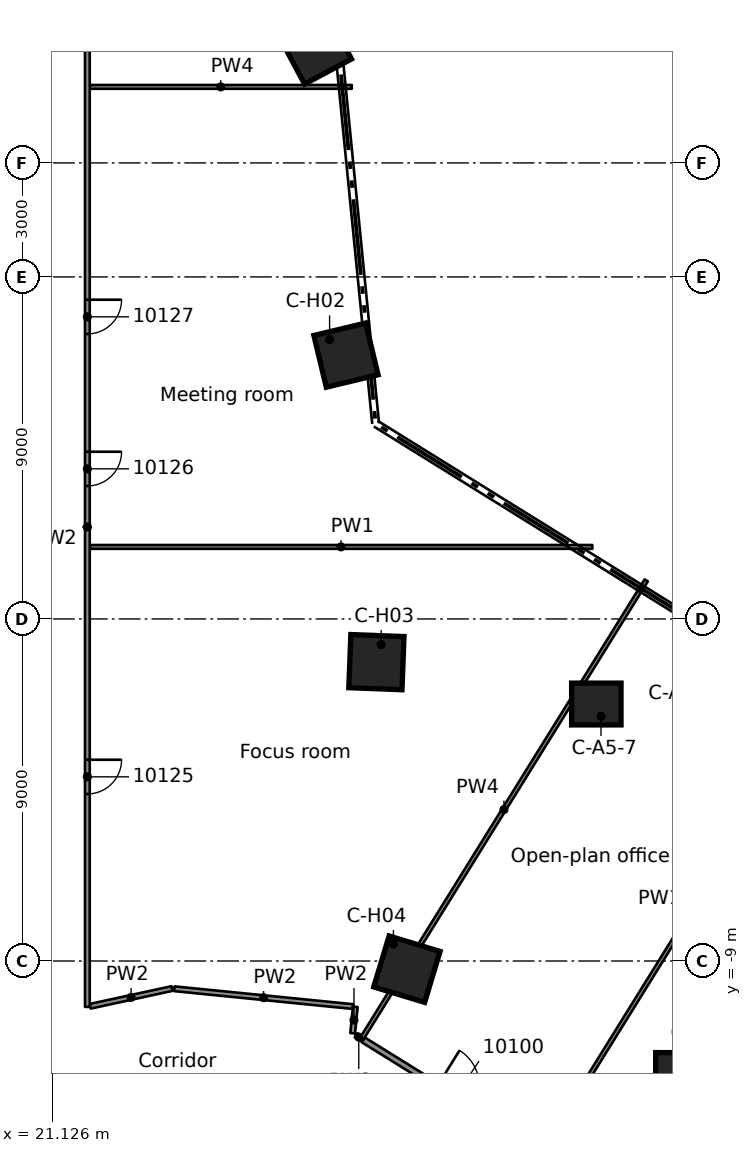
"""IFC4 building model, lengths in metres.
Left out: names, types, materials, properties, quantities, classifications, styles, units other than length and angle.
Written with IfcOpenShell. Run it as: python <this file> out.ifc"""

import sys

from ifc_helpers import new_model, si_unit, direction, frame, frame_2d, origin, origin_2d, place, context, subcontext, project, spatial, rectangle, extrude, element, fill, save


model = new_model("IFC4")
c1 = context("Model", 3, precision=1e-05, world=origin(), true_north=direction((0.0, 1.0)))
c2 = subcontext(c1, "Body", "Model", "MODEL_VIEW")
j1 = project(units=[si_unit("LENGTHUNIT", "METRE"), si_unit("PLANEANGLEUNIT", "RADIAN")], contexts=[c1])
p1 = place(None, origin())
s1 = spatial("IfcSite", under=j1, at=p1, CompositionType="ELEMENT")
p2 = place(p1, origin())
s2 = spatial("IfcBuilding", under=s1, at=p2, CompositionType="ELEMENT")
p3 = place(p2, frame((0.0, 0.0, 51.3)))
s3 = spatial("IfcBuildingStorey", under=s2, at=p3, CompositionType="ELEMENT", Elevation=51.3)
for number, where, z_axis, x_axis in (
    (1, (37.655, -11.96, 0.0), (0.0, 0.0, 1.0), (1.0, 0.0, 0.0)),
    (2, (35.444, -2.238, 0.0), (0.0, 0.0, 1.0), (1.0, 0.0, 0.0)),
):
    element("IfcColumn", number, at=place(p3, frame(where, z_axis=z_axis, x_axis=x_axis)), inside=s3, PredefinedType="COLUMN", context=c2, shape_type="SweptSolid", body=[
        extrude(rectangle(XDim=1.3, YDim=1.1, at=origin_2d()), origin(), (0.0, 0.0, 1.0), 3.5),
    ])
for number, where, z_axis, x_axis in (
    (3, (28.054, 15.021, 0.0), (0.0, 0.0, 1.0), (0.882, 0.472, 0.0)),
    (4, (28.856, 6.942, 0.0), (0.0, 0.0, 1.0), (0.972, 0.234, 0.0)),
    (5, (29.657, -1.136, 0.0), (0.0, 0.0, 1.0), (0.999, -0.038, 0.0)),
    (6, (30.459, -9.215, 0.0), (0.0, 0.0, 1.0), (0.957, -0.29, 0.0)),
):
    element("IfcColumn", number, at=place(p3, frame(where, z_axis=z_axis, x_axis=x_axis)), inside=s3, PredefinedType="COLUMN", context=c2, shape_type="SweptSolid", body=[
        extrude(rectangle(XDim=1.4, YDim=1.4, at=origin_2d()), origin(), (0.0, 0.0, 1.0), 3.5),
    ])
p4 = place(p3, frame((29.31, -11.074, 0.0), z_axis=(0.0, 0.0, 1.0), x_axis=(0.849545912719, -0.527514684329, 0.0)))
e7 = element("IfcWall", 7, at=p4, inside=s3, PredefinedType="PARTITIONING", context=c2, shape_type="SweptSolid", body=[
    extrude(rectangle(XDim=24.457, YDim=0.15, at=frame_2d((12.228, 0.0))), origin(), (0.0, 0.0, 1.0), 3.08),
])
p5 = place(p4, frame((2.3, 0.0, 0.0)))
e8 = element("IfcOpeningElement", 8, at=p5, cuts=e7, PredefinedType="OPENING", context=c2, shape_type="SweptSolid", body=[
    extrude(rectangle(XDim=1.1, YDim=2.1, at=frame_2d((0.55, 1.05))), frame((0.0, 0.085, 0.0), z_axis=(0.0, -1.0, 0.0), x_axis=(1.0, 0.0, 0.0)), (0.0, 0.0, 1.0), 0.17),
])
p6 = place(p4, frame((11.658, 0.0, 0.0)))
e9 = element("IfcOpeningElement", 9, at=p6, cuts=e7, PredefinedType="OPENING", context=c2, shape_type="SweptSolid", body=[
    extrude(rectangle(XDim=1.8, YDim=2.1, at=frame_2d((0.9, 1.05))), frame((0.0, 0.085, 0.0), z_axis=(0.0, -1.0, 0.0), x_axis=(1.0, 0.0, 0.0)), (0.0, 0.0, 1.0), 0.17),
])
p7 = place(p3, frame((29.117, -10.955, 0.0), z_axis=(0.0, 0.0, 1.0), x_axis=(0.851611075983, -0.524174184087, 0.0)))
e10 = element("IfcWall", 10, at=p7, inside=s3, PredefinedType="PARTITIONING", context=c2, shape_type="SweptSolid", body=[
    extrude(rectangle(XDim=0.177, YDim=0.125, at=frame_2d((0.089, 0.0))), origin(), (0.0, 0.0, 1.0), 3.08),
])
p8 = place(p3, frame((29.039, -10.199, 0.0), z_axis=(0.0, 0.0, 1.0), x_axis=(-0.995058150607, 0.099293891606, 0.0)))
e11 = element("IfcWall", 11, at=p8, inside=s3, PredefinedType="PARTITIONING", context=c2, shape_type="SweptSolid", body=[
    extrude(rectangle(XDim=4.723, YDim=0.125, at=frame_2d((2.362, 0.0))), origin(), (0.0, 0.0, 1.0), 3.08),
])
p9 = place(p3, frame((22.113, 1.896, 0.0), z_axis=(0.0, 0.0, 1.0), x_axis=(1.0, 0.0, 0.0)))
e12 = element("IfcWall", 12, at=p9, inside=s3, PredefinedType="PARTITIONING", context=c2, shape_type="SweptSolid", body=[
    extrude(rectangle(XDim=13.225, YDim=0.1, at=frame_2d((6.612, 0.0))), origin(), (0.0, 0.0, 1.0), 3.08),
])
p10 = place(p3, frame((22.113, 14.0, 0.0), z_axis=(0.0, 0.0, 1.0), x_axis=(1.0, 0.0, 0.0)))
e13 = element("IfcWall", 13, at=p10, inside=s3, PredefinedType="PARTITIONING", context=c2, shape_type="SweptSolid", body=[
    extrude(rectangle(XDim=6.896, YDim=0.1, at=frame_2d((3.448, 0.0))), origin(), (0.0, 0.0, 1.0), 2.445),
])
p11 = place(p3, frame((22.127, -10.191, 0.0), z_axis=(0.0, 0.0, 1.0), x_axis=(0.977235411969, 0.212157841227, 0.0)))
e14 = element("IfcWall", 14, at=p11, inside=s3, PredefinedType="PARTITIONING", context=c2, shape_type="SweptSolid", body=[
    extrude(rectangle(XDim=2.2, YDim=0.125, at=frame_2d((1.1, 0.0))), origin(), (0.0, 0.0, 1.0), 3.08),
])
p12 = place(p3, frame((34.072, -13.942, 0.0), z_axis=(0.0, 0.0, 1.0), x_axis=(0.527437304247, 0.84959395601, 0.0)))
e15 = element("IfcWall", 15, at=p12, inside=s3, PredefinedType="PARTITIONING", context=c2, shape_type="SweptSolid", body=[
    extrude(rectangle(XDim=14.123, YDim=0.1, at=frame_2d((7.062, 0.0))), origin(), (0.0, 0.0, 1.0), 3.08),
])
p13 = place(p3, frame((29.268, -11.048, 0.0), z_axis=(0.0, 0.0, 1.0), x_axis=(0.527446323462, 0.849588356716, 0.0)))
e16 = element("IfcWall", 16, at=p13, inside=s3, PredefinedType="PARTITIONING", context=c2, shape_type="SweptSolid", body=[
    extrude(rectangle(XDim=14.199, YDim=0.1, at=frame_2d((7.099, 0.0))), origin(), (0.0, 0.0, 1.0), 2.445),
])
p14 = place(p3, frame((29.032, -10.902, 0.0), z_axis=(0.0, 0.0, 1.0), x_axis=(0.098777968406, 0.995109497974, 0.0)))
e17 = element("IfcWall", 17, at=p14, inside=s3, PredefinedType="PARTITIONING", context=c2, shape_type="SweptSolid", body=[
    extrude(rectangle(XDim=0.699, YDim=0.125, at=frame_2d((0.35, 0.0))), origin(), (0.0, 0.0, 1.0), 3.08),
])
p15 = place(p3, frame((22.051, 15.05, 0.0), z_axis=(0.0, 0.0, 1.0), x_axis=(0.0, -1.0, 0.0)))
e18 = element("IfcWall", 18, at=p15, inside=s3, PredefinedType="PARTITIONING", context=c2, shape_type="SweptSolid", body=[
    extrude(rectangle(XDim=25.257, YDim=0.125, at=frame_2d((12.628, 0.0))), origin(), (0.0, 0.0, 1.0), 3.08),
])
p16 = place(p15, frame((18.754, 0.0, 0.0)))
e19 = element("IfcOpeningElement", 19, at=p16, cuts=e18, PredefinedType="OPENING", context=c2, shape_type="SweptSolid", body=[
    extrude(rectangle(XDim=0.9, YDim=2.1, at=frame_2d((0.45, 1.05))), frame((0.0, 0.073, 0.0), z_axis=(0.0, -1.0, 0.0), x_axis=(1.0, 0.0, 0.0)), (0.0, 0.0, 1.0), 0.145),
])
p17 = place(p15, frame((10.65, 0.0, 0.0)))
e20 = element("IfcOpeningElement", 20, at=p17, cuts=e18, PredefinedType="OPENING", context=c2, shape_type="SweptSolid", body=[
    extrude(rectangle(XDim=0.9, YDim=2.1, at=frame_2d((0.45, 1.05))), frame((0.0, 0.073, 0.0), z_axis=(0.0, -1.0, 0.0), x_axis=(1.0, 0.0, 0.0)), (0.0, 0.0, 1.0), 0.145),
])
p18 = place(p15, frame((6.65, 0.0, 0.0)))
e21 = element("IfcOpeningElement", 21, at=p18, cuts=e18, PredefinedType="OPENING", context=c2, shape_type="SweptSolid", body=[
    extrude(rectangle(XDim=0.9, YDim=2.1, at=frame_2d((0.45, 1.05))), frame((0.0, 0.073, 0.0), z_axis=(0.0, -1.0, 0.0), x_axis=(1.0, 0.0, 0.0)), (0.0, 0.0, 1.0), 0.145),
])
p19 = place(p16, origin())
e22 = element("IfcDoor", 22, at=p19, inside=s3, OperationType="SINGLE_SWING_RIGHT", PredefinedType="DOOR", context=c2, shape_type="SweptSolid", body=[
    extrude(rectangle(XDim=0.9, YDim=2.1, at=frame_2d((0.45, 1.05))), frame((0.0, 0.025, 0.0), z_axis=(0.0, -1.0, 0.0), x_axis=(1.0, 0.0, 0.0)), (0.0, 0.0, 1.0), 0.05),
])
fill(e19, e22)
p20 = place(p17, origin())
e23 = element("IfcDoor", 23, at=p20, inside=s3, OperationType="SINGLE_SWING_LEFT", PredefinedType="DOOR", context=c2, shape_type="SweptSolid", body=[
    extrude(rectangle(XDim=0.9, YDim=2.1, at=frame_2d((0.45, 1.05))), frame((0.0, 0.025, 0.0), z_axis=(0.0, -1.0, 0.0), x_axis=(1.0, 0.0, 0.0)), (0.0, 0.0, 1.0), 0.05),
])
fill(e20, e23)
p21 = place(p18, origin())
e24 = element("IfcDoor", 24, at=p21, inside=s3, OperationType="SINGLE_SWING_LEFT", PredefinedType="DOOR", context=c2, shape_type="SweptSolid", body=[
    extrude(rectangle(XDim=0.9, YDim=2.1, at=frame_2d((0.45, 1.05))), frame((0.0, 0.025, 0.0), z_axis=(0.0, -1.0, 0.0), x_axis=(1.0, 0.0, 0.0)), (0.0, 0.0, 1.0), 0.05),
])
fill(e21, e24)
save(model, sys.argv[1])
